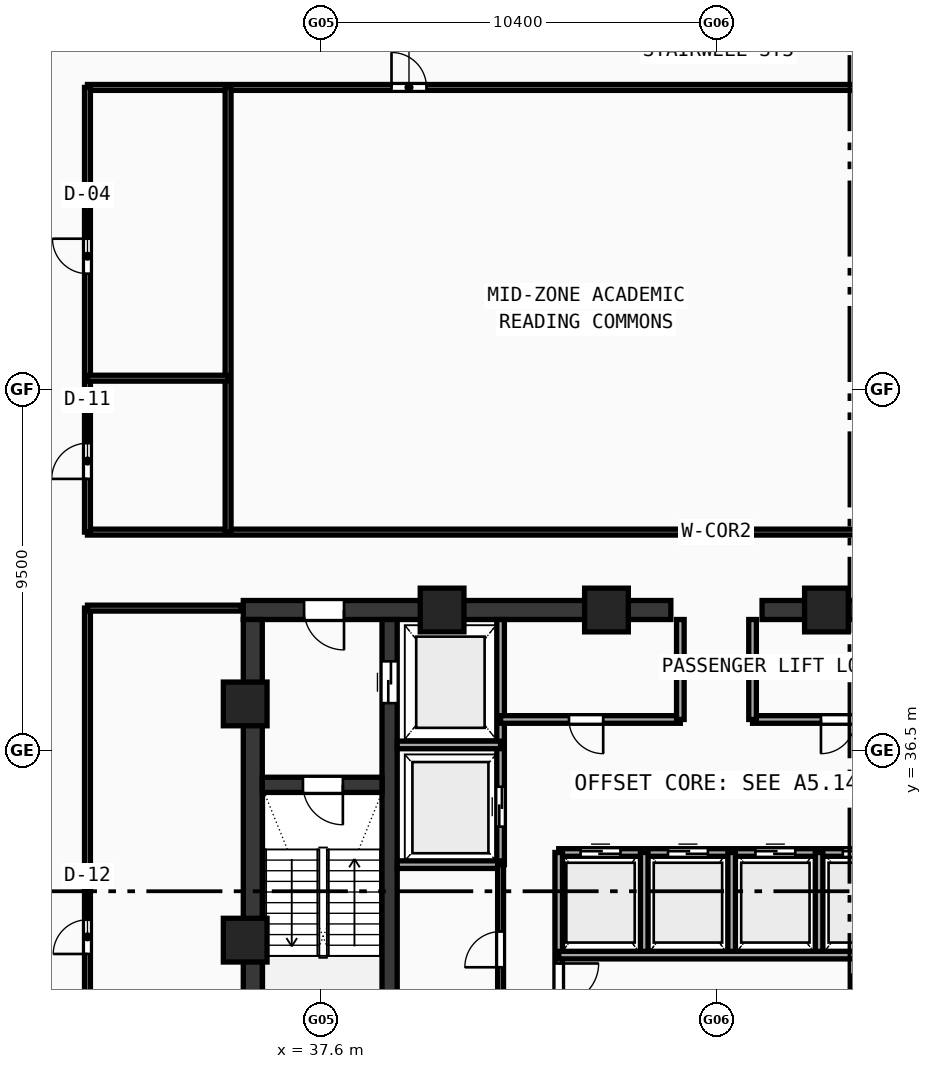
"""IFC4 building model, lengths in metres.
Left out: names, types, materials, properties, quantities, classifications, styles, units other than length and angle.
Written with IfcOpenShell. Run it as: python <this file> out.ifc"""

import sys

from ifc_helpers import new_model, si_unit, direction, frame, frame_2d, origin, origin_with_axes, origin_2d, place, context, subcontext, project, spatial, rectangle, hollow_rectangle, extrude, source, transform, mapped, element, fill, save


model = new_model("IFC4")
c1 = context("Model", 3, precision=1e-05, world=origin(), true_north=direction((0.0, 1.0)))
c2 = subcontext(c1, "Body", "Model", "MODEL_VIEW")
j1 = project(units=[si_unit("LENGTHUNIT", "METRE"), si_unit("PLANEANGLEUNIT", "RADIAN")], contexts=[c1])
p1 = place(None, origin())
s1 = spatial("IfcSite", under=j1, at=p1, CompositionType="ELEMENT")
p2 = place(p1, origin())
s2 = spatial("IfcBuilding", under=s1, at=p2, CompositionType="ELEMENT")
p3 = place(p2, frame((0.0, 0.0, 215.16)))
s3 = spatial("IfcBuildingStorey", under=s2, at=p3, CompositionType="ELEMENT", Elevation=215.16)
p4 = place(p3, frame((35.55, 40.2, 0.0), z_axis=(0.0, 0.0, 1.0), x_axis=(1.0, 0.0, 0.0)))
e1 = element("IfcWall", 1, at=p4, inside=s3, PredefinedType="SHEAR", context=c2, shape_type="SweptSolid", body=[
    extrude(rectangle(XDim=11.25, YDim=0.5, at=frame_2d((5.625, 0.0))), origin(), (0.0, 0.0, 1.0), 3.52),
])
p5 = place(p4, frame((1.6, 0.0, 0.0)))
e2 = element("IfcOpeningElement", 2, at=p5, cuts=e1, PredefinedType="OPENING", context=c2, shape_type="SweptSolid", body=[
    extrude(rectangle(XDim=1.05, YDim=2.1, at=frame_2d((0.525, 1.05))), frame((0.0, 0.26, 0.0), z_axis=(0.0, -1.0, 0.0), x_axis=(1.0, 0.0, 0.0)), (0.0, 0.0, 1.0), 0.52),
])
p6 = place(p3, frame((49.2, 40.2, 0.0), z_axis=(0.0, 0.0, 1.0), x_axis=(1.0, 0.0, 0.0)))
e3 = element("IfcWall", 3, at=p6, inside=s3, PredefinedType="SHEAR", context=c2, shape_type="SweptSolid", body=[
    extrude(rectangle(XDim=11.25, YDim=0.5, at=frame_2d((5.625, 0.0))), origin(), (0.0, 0.0, 1.0), 3.52),
])
p7 = place(p6, frame((8.6, 0.0, 0.0)))
e4 = element("IfcOpeningElement", 4, at=p7, cuts=e3, PredefinedType="OPENING", context=c2, shape_type="SweptSolid", body=[
    extrude(rectangle(XDim=1.05, YDim=2.1, at=frame_2d((0.525, 1.05))), frame((0.0, 0.26, 0.0), z_axis=(0.0, -1.0, 0.0), x_axis=(1.0, 0.0, 0.0)), (0.0, 0.0, 1.0), 0.52),
])
p8 = place(p3, frame((35.8, 27.75, 0.0), z_axis=(0.0, 0.0, 1.0), x_axis=(0.0, 1.0, 0.0)))
e5 = element("IfcWall", 5, at=p8, inside=s3, PredefinedType="SHEAR", context=c2, shape_type="SweptSolid", body=[
    extrude(rectangle(XDim=12.2, YDim=0.5, at=frame_2d((6.1, 0.0))), origin(), (0.0, 0.0, 1.0), 3.52),
])
p9 = place(p3, frame((39.4, 27.75, 0.0), z_axis=(0.0, 0.0, 1.0), x_axis=(0.0, 1.0, 0.0)))
e6 = element("IfcWall", 6, at=p9, inside=s3, PredefinedType="SHEAR", context=c2, shape_type="SweptSolid", body=[
    extrude(rectangle(XDim=12.2, YDim=0.4, at=frame_2d((6.1, 0.0))), origin(), (0.0, 0.0, 1.0), 3.52),
])
p10 = place(p9, frame((10.0, 0.0, 0.0)))
e7 = element("IfcOpeningElement", 7, at=p10, cuts=e6, PredefinedType="OPENING", context=c2, shape_type="SweptSolid", body=[
    extrude(rectangle(XDim=1.1, YDim=2.1, at=frame_2d((0.55, 1.05))), frame((0.0, 0.21, 0.0), z_axis=(0.0, -1.0, 0.0), x_axis=(1.0, 0.0, 0.0)), (0.0, 0.0, 1.0), 0.42),
])
p11 = place(p3, frame((36.05, 35.6, 0.0), z_axis=(0.0, 0.0, 1.0), x_axis=(1.0, 0.0, 0.0)))
e8 = element("IfcWall", 8, at=p11, inside=s3, PredefinedType="SHEAR", context=c2, shape_type="SweptSolid", body=[
    extrude(rectangle(XDim=3.15, YDim=0.4, at=frame_2d((1.575, 0.0))), origin(), (0.0, 0.0, 1.0), 3.52),
])
p12 = place(p11, frame((1.07, 0.0, 0.0)))
e9 = element("IfcOpeningElement", 9, at=p12, cuts=e8, PredefinedType="OPENING", context=c2, shape_type="SweptSolid", body=[
    extrude(rectangle(XDim=1.05, YDim=2.1, at=frame_2d((0.525, 1.05))), frame((0.0, 0.21, 0.0), z_axis=(0.0, -1.0, 0.0), x_axis=(1.0, 0.0, 0.0)), (0.0, 0.0, 1.0), 0.42),
])
m1 = source(origin(), c2, "Body", "SweptSolid", [
    extrude(hollow_rectangle(XDim=1.15, YDim=1.15, WallThickness=0.048, at=origin_2d()), origin(), (0.0, 0.0, 1.0), 3.78),
])
for number, where, z_axis, x_axis in (
    (10, (50.894, 40.2, -0.26), (0.0, 0.0, 1.0), (1.0, 0.0, 0.0)),
    (11, (45.106, 40.2, -0.26), (0.0, 0.0, 1.0), (1.0, 0.0, 0.0)),
    (12, (40.781, 40.2, -0.26), (0.0, 0.0, 1.0), (1.0, 0.0, 0.0)),
    (13, (35.6, 37.729, -0.26), (0.0, 0.0, 1.0), (1.0, 0.0, 0.0)),
    (14, (35.6, 31.513, -0.26), (0.0, 0.0, 1.0), (1.0, 0.0, 0.0)),
):
    element("IfcColumn", number, at=place(p3, frame(where, z_axis=z_axis, x_axis=x_axis)), inside=s3, PredefinedType="COLUMN", context=c2, shape_type="MappedRepresentation", body=[
        mapped(m1, transform((0.0, 0.0, 0.0), scale=1.0)),
    ])
p13 = place(p3, frame((42.32, 33.5, 0.0), z_axis=(0.0, 0.0, 1.0), x_axis=(0.0, 1.0, 0.0)))
e15 = element("IfcWall", 15, at=p13, inside=s3, PredefinedType="SOLIDWALL", context=c2, shape_type="SweptSolid", body=[
    extrude(rectangle(XDim=6.45, YDim=0.2, at=frame_2d((3.225, 0.0))), origin(), (0.0, 0.0, 1.0), 3.52),
])
p14 = place(p13, frame((1.0, 0.0, 0.0)))
e16 = element("IfcOpeningElement", 16, at=p14, cuts=e15, PredefinedType="OPENING", context=c2, shape_type="SweptSolid", body=[
    extrude(rectangle(XDim=1.05, YDim=2.1, at=frame_2d((0.525, 1.05))), frame((0.0, 0.11, 0.0), z_axis=(0.0, -1.0, 0.0), x_axis=(1.0, 0.0, 0.0)), (0.0, 0.0, 1.0), 0.22),
])
for number, where, z_axis, x_axis in (
    (17, (39.6, 36.65, 0.0), (0.0, 0.0, 1.0), (1.0, 0.0, 0.0)),
    (18, (39.6, 33.5, 0.0), (0.0, 0.0, 1.0), (1.0, 0.0, 0.0)),
):
    element("IfcWall", number, at=place(p3, frame(where, z_axis=z_axis, x_axis=x_axis)), inside=s3, PredefinedType="SOLIDWALL", context=c2, shape_type="SweptSolid", body=[
        extrude(rectangle(XDim=2.72, YDim=0.2, at=frame_2d((1.36, 0.0))), origin(), (0.0, 0.0, 1.0), 3.52),
    ])
p15 = place(p3, frame((42.32, 37.32, 0.0), z_axis=(0.0, 0.0, 1.0), x_axis=(1.0, 0.0, 0.0)))
e19 = element("IfcWall", 19, at=p15, inside=s3, PredefinedType="SOLIDWALL", context=c2, shape_type="SweptSolid", body=[
    extrude(rectangle(XDim=4.73, YDim=0.2, at=frame_2d((2.365, 0.0))), origin(), (0.0, 0.0, 1.0), 3.52),
])
p16 = place(p15, frame((1.8, 0.0, 0.0)))
e20 = element("IfcOpeningElement", 20, at=p16, cuts=e19, PredefinedType="OPENING", context=c2, shape_type="SweptSolid", body=[
    extrude(rectangle(XDim=0.9, YDim=2.1, at=frame_2d((0.45, 1.05))), frame((0.0, 0.11, 0.0), z_axis=(0.0, -1.0, 0.0), x_axis=(1.0, 0.0, 0.0)), (0.0, 0.0, 1.0), 0.22),
])
p17 = place(p3, frame((48.95, 37.32, 0.0), z_axis=(0.0, 0.0, 1.0), x_axis=(1.0, 0.0, 0.0)))
e21 = element("IfcWall", 21, at=p17, inside=s3, PredefinedType="SOLIDWALL", context=c2, shape_type="SweptSolid", body=[
    extrude(rectangle(XDim=4.73, YDim=0.2, at=frame_2d((2.365, 0.0))), origin(), (0.0, 0.0, 1.0), 3.52),
])
p18 = place(p17, frame((1.8, 0.0, 0.0)))
e22 = element("IfcOpeningElement", 22, at=p18, cuts=e21, PredefinedType="OPENING", context=c2, shape_type="SweptSolid", body=[
    extrude(rectangle(XDim=0.9, YDim=2.1, at=frame_2d((0.45, 1.05))), frame((0.0, 0.11, 0.0), z_axis=(0.0, -1.0, 0.0), x_axis=(1.0, 0.0, 0.0)), (0.0, 0.0, 1.0), 0.22),
])
for number, where, z_axis, x_axis in (
    (23, (47.05, 37.32, 0.0), (0.0, 0.0, 1.0), (0.0, 1.0, 0.0)),
    (24, (48.95, 37.32, 0.0), (0.0, 0.0, 1.0), (0.0, 1.0, 0.0)),
):
    element("IfcWall", number, at=place(p3, frame(where, z_axis=z_axis, x_axis=x_axis)), inside=s3, PredefinedType="SOLIDWALL", context=c2, shape_type="SweptSolid", body=[
        extrude(rectangle(XDim=2.63, YDim=0.2, at=frame_2d((1.315, 0.0))), origin(), (0.0, 0.0, 1.0), 3.52),
    ])
p19 = place(p3, frame((43.85, 33.82, 0.0), z_axis=(0.0, 0.0, 1.0), x_axis=(1.0, 0.0, 0.0)))
e25 = element("IfcWall", 25, at=p19, inside=s3, PredefinedType="SOLIDWALL", context=c2, shape_type="SweptSolid", body=[
    extrude(rectangle(XDim=9.83, YDim=0.2, at=frame_2d((4.915, 0.0))), origin(), (0.0, 0.0, 1.0), 3.52),
])
p20 = place(p19, frame((0.575, 0.0, 0.0)))
e26 = element("IfcOpeningElement", 26, at=p20, cuts=e25, PredefinedType="OPENING", context=c2, shape_type="SweptSolid", body=[
    extrude(rectangle(XDim=1.05, YDim=2.1, at=frame_2d((0.525, 1.05))), frame((0.0, 0.11, 0.0), z_axis=(0.0, -1.0, 0.0), x_axis=(1.0, 0.0, 0.0)), (0.0, 0.0, 1.0), 0.22),
])
p21 = place(p19, frame((2.875, 0.0, 0.0)))
e27 = element("IfcOpeningElement", 27, at=p21, cuts=e25, PredefinedType="OPENING", context=c2, shape_type="SweptSolid", body=[
    extrude(rectangle(XDim=1.05, YDim=2.1, at=frame_2d((0.525, 1.05))), frame((0.0, 0.11, 0.0), z_axis=(0.0, -1.0, 0.0), x_axis=(1.0, 0.0, 0.0)), (0.0, 0.0, 1.0), 0.22),
])
p22 = place(p19, frame((5.175, 0.0, 0.0)))
e28 = element("IfcOpeningElement", 28, at=p22, cuts=e25, PredefinedType="OPENING", context=c2, shape_type="SweptSolid", body=[
    extrude(rectangle(XDim=1.05, YDim=2.1, at=frame_2d((0.525, 1.05))), frame((0.0, 0.11, 0.0), z_axis=(0.0, -1.0, 0.0), x_axis=(1.0, 0.0, 0.0)), (0.0, 0.0, 1.0), 0.22),
])
p23 = place(p19, frame((7.475, 0.0, 0.0)))
e29 = element("IfcOpeningElement", 29, at=p23, cuts=e25, PredefinedType="OPENING", context=c2, shape_type="SweptSolid", body=[
    extrude(rectangle(XDim=1.05, YDim=2.1, at=frame_2d((0.525, 1.05))), frame((0.0, 0.11, 0.0), z_axis=(0.0, -1.0, 0.0), x_axis=(1.0, 0.0, 0.0)), (0.0, 0.0, 1.0), 0.22),
])
p24 = place(p3, frame((43.85, 27.6, 0.0), z_axis=(0.0, 0.0, 1.0), x_axis=(0.0, 1.0, 0.0)))
e30 = element("IfcWall", 30, at=p24, inside=s3, PredefinedType="SOLIDWALL", context=c2, shape_type="SweptSolid", body=[
    extrude(rectangle(XDim=6.22, YDim=0.2, at=frame_2d((3.11, 0.0))), origin(), (0.0, 0.0, 1.0), 3.52),
])
p25 = place(p24, frame((2.25, 0.0, 0.0)))
e31 = element("IfcOpeningElement", 31, at=p25, cuts=e30, PredefinedType="OPENING", context=c2, shape_type="SweptSolid", body=[
    extrude(rectangle(XDim=1.05, YDim=2.1, at=frame_2d((0.525, 1.05))), frame((0.0, 0.11, 0.0), z_axis=(0.0, -1.0, 0.0), x_axis=(1.0, 0.0, 0.0)), (0.0, 0.0, 1.0), 0.22),
])
for number, where, z_axis, x_axis in (
    (32, (46.1, 31.12, 0.0), (0.0, 0.0, 1.0), (0.0, 1.0, 0.0)),
    (33, (48.4, 31.12, 0.0), (0.0, 0.0, 1.0), (0.0, 1.0, 0.0)),
    (34, (50.7, 31.12, 0.0), (0.0, 0.0, 1.0), (0.0, 1.0, 0.0)),
):
    element("IfcWall", number, at=place(p3, frame(where, z_axis=z_axis, x_axis=x_axis)), inside=s3, PredefinedType="SOLIDWALL", context=c2, shape_type="SweptSolid", body=[
        extrude(rectangle(XDim=2.7, YDim=0.2, at=frame_2d((1.35, 0.0))), origin(), (0.0, 0.0, 1.0), 3.52),
    ])
p26 = place(p3, frame((43.85, 31.12, 0.0), z_axis=(0.0, 0.0, 1.0), x_axis=(1.0, 0.0, 0.0)))
e35 = element("IfcWall", 35, at=p26, inside=s3, PredefinedType="SOLIDWALL", context=c2, shape_type="SweptSolid", body=[
    extrude(rectangle(XDim=9.83, YDim=0.2, at=frame_2d((4.915, 0.0))), origin(), (0.0, 0.0, 1.0), 3.52),
])
p27 = place(p3, frame((42.32, 27.6, 0.0), z_axis=(0.0, 0.0, 1.0), x_axis=(0.0, 1.0, 0.0)))
e36 = element("IfcWall", 36, at=p27, inside=s3, PredefinedType="PARTITIONING", context=c2, shape_type="SweptSolid", body=[
    extrude(rectangle(XDim=5.9, YDim=0.155, at=frame_2d((2.95, 0.0))), origin(), (0.0, 0.0, 1.0), 3.52),
])
p28 = place(p27, frame((3.2, 0.0, 0.0)))
e37 = element("IfcOpeningElement", 37, at=p28, cuts=e36, PredefinedType="OPENING", context=c2, shape_type="SweptSolid", body=[
    extrude(rectangle(XDim=0.94, YDim=2.1, at=frame_2d((0.47, 1.05))), frame((0.0, 0.087, 0.0), z_axis=(0.0, -1.0, 0.0), x_axis=(1.0, 0.0, 0.0)), (0.0, 0.0, 1.0), 0.175),
])
p29 = place(p3, frame((31.45, 42.25, 0.0), z_axis=(0.0, 0.0, 1.0), x_axis=(1.0, 0.0, 0.0)))
e38 = element("IfcWall", 38, at=p29, inside=s3, PredefinedType="PARTITIONING", context=c2, shape_type="SweptSolid", body=[
    extrude(rectangle(XDim=33.1, YDim=0.155, at=frame_2d((16.55, 0.0))), origin(), (0.0, 0.0, 1.0), 2.87),
])
p30 = place(p3, frame((31.45, 53.95, 0.0), z_axis=(0.0, 0.0, 1.0), x_axis=(1.0, 0.0, 0.0)))
e39 = element("IfcWall", 39, at=p30, inside=s3, PredefinedType="PARTITIONING", context=c2, shape_type="SweptSolid", body=[
    extrude(rectangle(XDim=33.1, YDim=0.155, at=frame_2d((16.55, 0.0))), origin(), (0.0, 0.0, 1.0), 2.87),
])
p31 = place(p30, frame((8.0, 0.0, 0.0)))
e40 = element("IfcOpeningElement", 40, at=p31, cuts=e39, PredefinedType="OPENING", context=c2, shape_type="SweptSolid", body=[
    extrude(rectangle(XDim=0.92, YDim=2.1, at=frame_2d((0.46, 1.05))), frame((0.0, 0.087, 0.0), z_axis=(0.0, -1.0, 0.0), x_axis=(1.0, 0.0, 0.0)), (0.0, 0.0, 1.0), 0.175),
])
p32 = place(p30, frame((27.05, 0.0, 0.0)))
e41 = element("IfcOpeningElement", 41, at=p32, cuts=e39, PredefinedType="OPENING", context=c2, shape_type="SweptSolid", body=[
    extrude(rectangle(XDim=0.92, YDim=2.1, at=frame_2d((0.46, 1.05))), frame((0.0, 0.087, 0.0), z_axis=(0.0, -1.0, 0.0), x_axis=(1.0, 0.0, 0.0)), (0.0, 0.0, 1.0), 0.175),
])
p33 = place(p3, frame((31.45, 42.25, 0.0), z_axis=(0.0, 0.0, 1.0), x_axis=(0.0, 1.0, 0.0)))
e42 = element("IfcWall", 42, at=p33, inside=s3, PredefinedType="PARTITIONING", context=c2, shape_type="SweptSolid", body=[
    extrude(rectangle(XDim=11.7, YDim=0.155, at=frame_2d((5.85, 0.0))), origin(), (0.0, 0.0, 1.0), 2.87),
])
p34 = place(p33, frame((1.4, 0.0, 0.0)))
e43 = element("IfcOpeningElement", 43, at=p34, cuts=e42, PredefinedType="OPENING", context=c2, shape_type="SweptSolid", body=[
    extrude(rectangle(XDim=0.94, YDim=2.1, at=frame_2d((0.47, 1.05))), frame((0.0, 0.087, 0.0), z_axis=(0.0, -1.0, 0.0), x_axis=(1.0, 0.0, 0.0)), (0.0, 0.0, 1.0), 0.175),
])
p35 = place(p33, frame((6.8, 0.0, 0.0)))
e44 = element("IfcOpeningElement", 44, at=p35, cuts=e42, PredefinedType="OPENING", context=c2, shape_type="SweptSolid", body=[
    extrude(rectangle(XDim=0.92, YDim=2.1, at=frame_2d((0.46, 1.05))), frame((0.0, 0.087, 0.0), z_axis=(0.0, -1.0, 0.0), x_axis=(1.0, 0.0, 0.0)), (0.0, 0.0, 1.0), 0.175),
])
p36 = place(p3, frame((35.15, 42.25, 0.0), z_axis=(0.0, 0.0, 1.0), x_axis=(0.0, 1.0, 0.0)))
e45 = element("IfcWall", 45, at=p36, inside=s3, PredefinedType="PARTITIONING", context=c2, shape_type="SweptSolid", body=[
    extrude(rectangle(XDim=11.7, YDim=0.155, at=frame_2d((5.85, 0.0))), origin(), (0.0, 0.0, 1.0), 2.87),
])
p37 = place(p3, frame((31.45, 46.3, 0.0), z_axis=(0.0, 0.0, 1.0), x_axis=(1.0, 0.0, 0.0)))
e46 = element("IfcWall", 46, at=p37, inside=s3, PredefinedType="PARTITIONING", context=c2, shape_type="SweptSolid", body=[
    extrude(rectangle(XDim=3.7, YDim=0.155, at=frame_2d((1.85, 0.0))), origin(), (0.0, 0.0, 1.0), 2.87),
])
p38 = place(p3, frame((31.45, 23.65, 0.0), z_axis=(0.0, 0.0, 1.0), x_axis=(0.0, 1.0, 0.0)))
e47 = element("IfcWall", 47, at=p38, inside=s3, PredefinedType="PARTITIONING", context=c2, shape_type="SweptSolid", body=[
    extrude(rectangle(XDim=16.6, YDim=0.155, at=frame_2d((8.3, 0.0))), origin(), (0.0, 0.0, 1.0), 2.87),
])
p39 = place(p38, frame((7.5, 0.0, 0.0)))
e48 = element("IfcOpeningElement", 48, at=p39, cuts=e47, PredefinedType="OPENING", context=c2, shape_type="SweptSolid", body=[
    extrude(rectangle(XDim=0.9, YDim=2.08, at=frame_2d((0.45, 1.04))), frame((0.0, 0.087, 0.0), z_axis=(0.0, -1.0, 0.0), x_axis=(1.0, 0.0, 0.0)), (0.0, 0.0, 1.0), 0.175),
])
p40 = place(p3, frame((31.45, 40.25, 0.0), z_axis=(0.0, 0.0, 1.0), x_axis=(1.0, 0.0, 0.0)))
e49 = element("IfcWall", 49, at=p40, inside=s3, PredefinedType="PARTITIONING", context=c2, shape_type="SweptSolid", body=[
    extrude(rectangle(XDim=4.05, YDim=0.155, at=frame_2d((2.025, 0.0))), origin(), (0.0, 0.0, 1.0), 3.52),
])
m2 = source(origin(), c2, "Body", "SweptSolid", [
    extrude(rectangle(XDim=1.05, YDim=2.1, at=frame_2d((0.525, 1.05))), frame((0.0, 0.025, 0.0), z_axis=(0.0, -1.0, 0.0), x_axis=(1.0, 0.0, 0.0)), (0.0, 0.0, 1.0), 0.05),
])
p41 = place(p12, frame((1.05, 0.0, 0.0), z_axis=(0.0, 0.0, 1.0), x_axis=(-1.0, 0.0, 0.0)))
e50 = element("IfcDoor", 50, at=p41, inside=s3, OperationType="SINGLE_SWING_LEFT", PredefinedType="DOOR", context=c2, shape_type="MappedRepresentation", body=[
    mapped(m2, transform((0.0, 0.0, 0.0), scale=1.0)),
])
fill(e9, e50)
p42 = place(p5, frame((1.05, 0.0, 0.0), z_axis=(0.0, 0.0, 1.0), x_axis=(-1.0, 0.0, 0.0)))
e51 = element("IfcDoor", 51, at=p42, inside=s3, OperationType="SINGLE_SWING_LEFT", PredefinedType="DOOR", context=c2, shape_type="MappedRepresentation", body=[
    mapped(m2, transform((0.0, 0.0, 0.0), scale=1.0)),
])
fill(e2, e51)
m3 = source(origin(), c2, "Body", "SweptSolid", [
    extrude(rectangle(XDim=1.1, YDim=2.1, at=frame_2d((0.55, 1.05))), frame((0.0, 0.025, 0.0), z_axis=(0.0, -1.0, 0.0), x_axis=(1.0, 0.0, 0.0)), (0.0, 0.0, 1.0), 0.05),
])
p43 = place(p10, frame((1.1, 0.0, 0.0), z_axis=(0.0, 0.0, 1.0), x_axis=(-1.0, 0.0, 0.0)))
e52 = element("IfcDoor", 52, at=p43, inside=s3, OperationType="DOUBLE_DOOR_SLIDING", PredefinedType="DOOR", context=c2, shape_type="MappedRepresentation", body=[
    mapped(m3, transform((0.0, 0.0, 0.0), scale=1.0)),
])
fill(e7, e52)
p44 = place(p14, origin_with_axes())
e53 = element("IfcDoor", 53, at=p44, inside=s3, OperationType="DOUBLE_DOOR_SLIDING", PredefinedType="DOOR", context=c2, shape_type="MappedRepresentation", body=[
    mapped(m2, transform((0.0, 0.0, 0.0), scale=1.0)),
])
fill(e16, e53)
m4 = source(origin(), c2, "Body", "SweptSolid", [
    extrude(rectangle(XDim=0.9, YDim=2.1, at=frame_2d((0.45, 1.05))), frame((0.0, 0.025, 0.0), z_axis=(0.0, -1.0, 0.0), x_axis=(1.0, 0.0, 0.0)), (0.0, 0.0, 1.0), 0.05),
])
p45 = place(p16, frame((0.9, 0.0, 0.0), z_axis=(0.0, 0.0, 1.0), x_axis=(-1.0, 0.0, 0.0)))
e54 = element("IfcDoor", 54, at=p45, inside=s3, OperationType="SINGLE_SWING_LEFT", PredefinedType="DOOR", context=c2, shape_type="MappedRepresentation", body=[
    mapped(m4, transform((0.0, 0.0, 0.0), scale=1.0)),
])
fill(e20, e54)
p46 = place(p18, frame((0.9, 0.0, 0.0), z_axis=(0.0, 0.0, 1.0), x_axis=(-1.0, 0.0, 0.0)))
e55 = element("IfcDoor", 55, at=p46, inside=s3, OperationType="SINGLE_SWING_RIGHT", PredefinedType="DOOR", context=c2, shape_type="MappedRepresentation", body=[
    mapped(m4, transform((0.0, 0.0, 0.0), scale=1.0)),
])
fill(e22, e55)
p47 = place(p20, origin_with_axes())
e56 = element("IfcDoor", 56, at=p47, inside=s3, OperationType="DOUBLE_DOOR_SLIDING", PredefinedType="DOOR", context=c2, shape_type="MappedRepresentation", body=[
    mapped(m2, transform((0.0, 0.0, 0.0), scale=1.0)),
])
fill(e26, e56)
p48 = place(p21, origin_with_axes())
e57 = element("IfcDoor", 57, at=p48, inside=s3, OperationType="DOUBLE_DOOR_SLIDING", PredefinedType="DOOR", context=c2, shape_type="MappedRepresentation", body=[
    mapped(m2, transform((0.0, 0.0, 0.0), scale=1.0)),
])
fill(e27, e57)
p49 = place(p22, origin_with_axes())
e58 = element("IfcDoor", 58, at=p49, inside=s3, OperationType="DOUBLE_DOOR_SLIDING", PredefinedType="DOOR", context=c2, shape_type="MappedRepresentation", body=[
    mapped(m2, transform((0.0, 0.0, 0.0), scale=1.0)),
])
fill(e28, e58)
p50 = place(p23, origin_with_axes())
e59 = element("IfcDoor", 59, at=p50, inside=s3, OperationType="DOUBLE_DOOR_SLIDING", PredefinedType="DOOR", context=c2, shape_type="MappedRepresentation", body=[
    mapped(m2, transform((0.0, 0.0, 0.0), scale=1.0)),
])
fill(e29, e59)
p51 = place(p25, frame((1.05, 0.0, 0.0), z_axis=(0.0, 0.0, 1.0), x_axis=(-1.0, 0.0, 0.0)))
e60 = element("IfcDoor", 60, at=p51, inside=s3, OperationType="SINGLE_SWING_LEFT", PredefinedType="DOOR", context=c2, shape_type="MappedRepresentation", body=[
    mapped(m2, transform((0.0, 0.0, 0.0), scale=1.0)),
])
fill(e31, e60)
m5 = source(origin(), c2, "Body", "SweptSolid", [
    extrude(rectangle(XDim=0.94, YDim=2.1, at=frame_2d((0.47, 1.05))), frame((0.0, 0.025, 0.0), z_axis=(0.0, -1.0, 0.0), x_axis=(1.0, 0.0, 0.0)), (0.0, 0.0, 1.0), 0.05),
])
p52 = place(p28, origin_with_axes())
e61 = element("IfcDoor", 61, at=p52, inside=s3, OperationType="SINGLE_SWING_LEFT", PredefinedType="DOOR", context=c2, shape_type="MappedRepresentation", body=[
    mapped(m5, transform((0.0, 0.0, 0.0), scale=1.0)),
])
fill(e37, e61)
p53 = place(p34, origin_with_axes())
e62 = element("IfcDoor", 62, at=p53, inside=s3, OperationType="SINGLE_SWING_LEFT", PredefinedType="DOOR", context=c2, shape_type="MappedRepresentation", body=[
    mapped(m5, transform((0.0, 0.0, 0.0), scale=1.0)),
])
fill(e43, e62)
m6 = source(origin(), c2, "Body", "SweptSolid", [
    extrude(rectangle(XDim=0.92, YDim=2.1, at=frame_2d((0.46, 1.05))), frame((0.0, 0.025, 0.0), z_axis=(0.0, -1.0, 0.0), x_axis=(1.0, 0.0, 0.0)), (0.0, 0.0, 1.0), 0.05),
])
p54 = place(p35, origin_with_axes())
e63 = element("IfcDoor", 63, at=p54, inside=s3, OperationType="SINGLE_SWING_RIGHT", PredefinedType="DOOR", context=c2, shape_type="MappedRepresentation", body=[
    mapped(m6, transform((0.0, 0.0, 0.0), scale=1.0)),
])
fill(e44, e63)
p55 = place(p31, origin_with_axes())
e64 = element("IfcDoor", 64, at=p55, inside=s3, OperationType="SINGLE_SWING_LEFT", PredefinedType="DOOR", context=c2, shape_type="MappedRepresentation", body=[
    mapped(m6, transform((0.0, 0.0, 0.0), scale=1.0)),
])
fill(e40, e64)
m7 = source(origin(), c2, "Body", "SweptSolid", [
    extrude(rectangle(XDim=0.9, YDim=2.08, at=frame_2d((0.45, 1.04))), frame((0.0, 0.025, 0.0), z_axis=(0.0, -1.0, 0.0), x_axis=(1.0, 0.0, 0.0)), (0.0, 0.0, 1.0), 0.05),
])
p56 = place(p39, origin_with_axes())
e65 = element("IfcDoor", 65, at=p56, inside=s3, OperationType="SINGLE_SWING_LEFT", PredefinedType="DOOR", context=c2, shape_type="MappedRepresentation", body=[
    mapped(m7, transform((0.0, 0.0, 0.0), scale=1.0)),
])
fill(e48, e65)
save(model, sys.argv[1])
